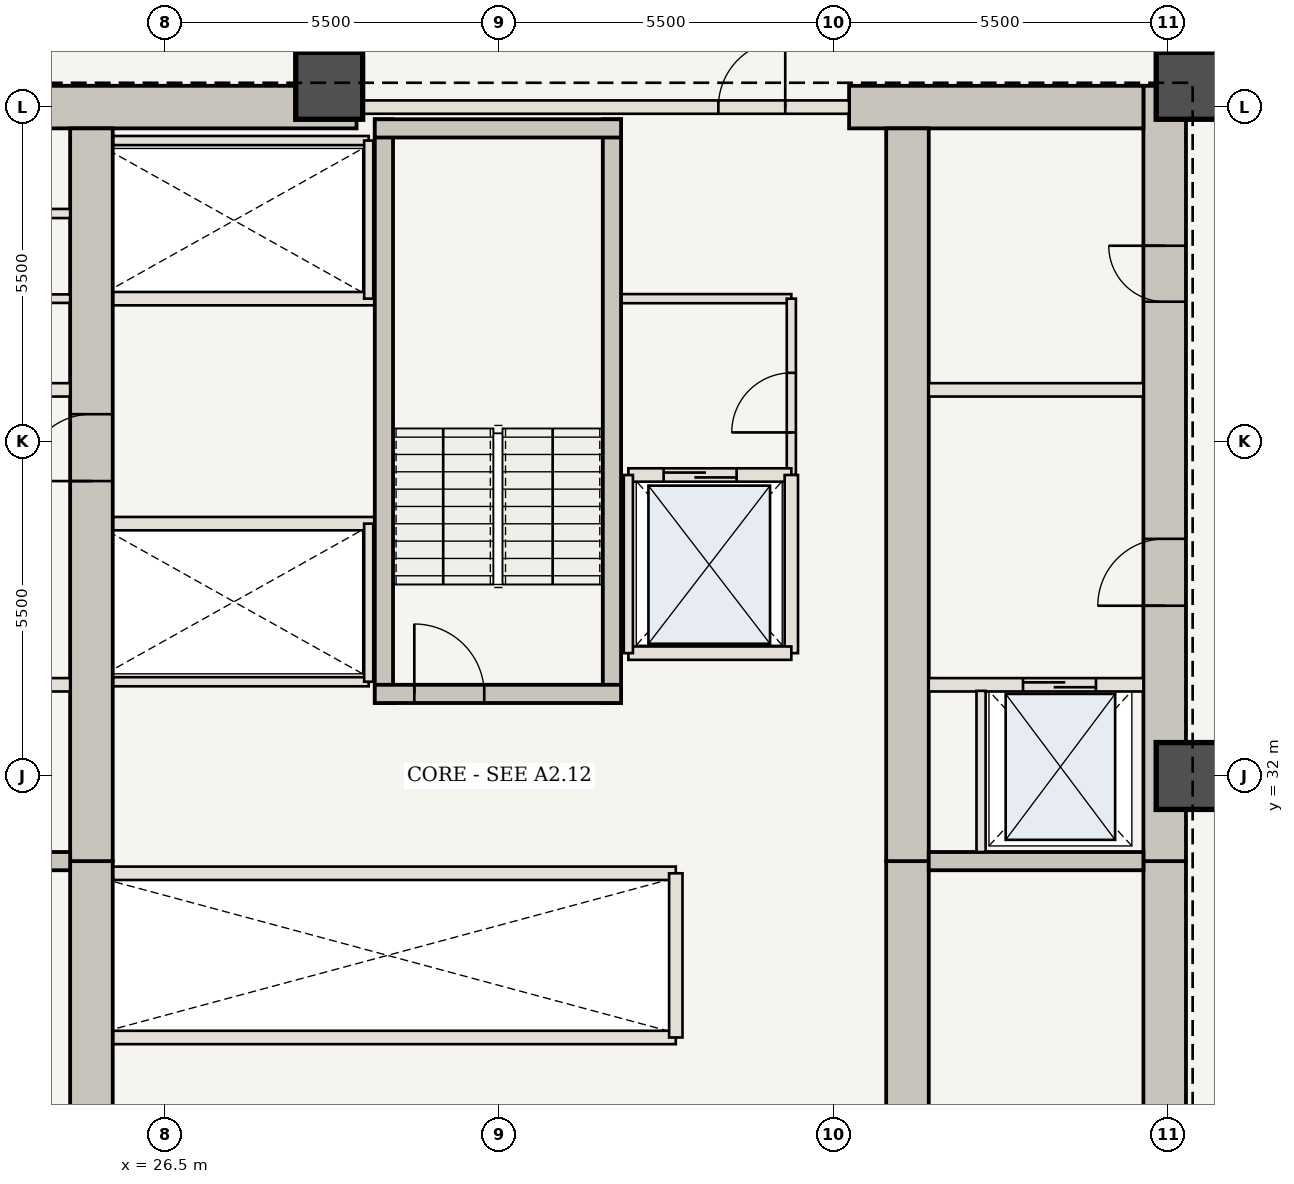
"""IFC4 building model, lengths in metres.
Left out: names, types, materials, properties, quantities, classifications, styles, units other than length and angle.
Written with IfcOpenShell. Run it as: python <this file> out.ifc"""

import sys

from ifc_helpers import new_model, si_unit, direction, frame, frame_2d, origin, origin_2d, place, context, subcontext, project, spatial, rectangle, extrude, element, fill, save


model = new_model("IFC4")
c1 = context("Model", 3, precision=1e-05, world=origin(), true_north=direction((0.0, 1.0)))
c2 = subcontext(c1, "Body", "Model", "MODEL_VIEW")
j1 = project(units=[si_unit("LENGTHUNIT", "METRE"), si_unit("PLANEANGLEUNIT", "RADIAN")], contexts=[c1])
p1 = place(None, origin())
s1 = spatial("IfcSite", under=j1, at=p1, CompositionType="ELEMENT")
p2 = place(p1, origin())
s2 = spatial("IfcBuilding", under=s1, at=p2, CompositionType="ELEMENT")
p3 = place(p2, frame((0.0, 0.0, 45.85)))
s3 = spatial("IfcBuildingStorey", under=s2, at=p3, CompositionType="ELEMENT", Elevation=45.85)
p4 = place(p3, frame((42.94, 20.6, 0.0), z_axis=(0.0, 0.0, 1.0), x_axis=(0.0, 1.0, 0.0)))
e1 = element("IfcWall", 1, at=p4, inside=s3, PredefinedType="SHEAR", context=c2, shape_type="SweptSolid", body=[
    extrude(rectangle(XDim=10.0, YDim=0.7, at=frame_2d((5.0, 0.0))), origin(), (0.0, 0.0, 1.0), 3.5),
])
p5 = place(p4, frame((1.15, 0.0, 0.0)))
e2 = element("IfcOpeningElement", 2, at=p5, cuts=e1, PredefinedType="OPENING", context=c2, shape_type="SweptSolid", body=[
    extrude(rectangle(XDim=1.15, YDim=2.15, at=frame_2d((0.575, 1.075))), frame((0.0, 0.36, 0.0), z_axis=(0.0, -1.0, 0.0), x_axis=(1.0, 0.0, 0.0)), (0.0, 0.0, 1.0), 0.72),
])
p6 = place(p3, frame((42.94, 30.6, 0.0), z_axis=(0.0, 0.0, 1.0), x_axis=(0.0, 1.0, 0.0)))
e3 = element("IfcWall", 3, at=p6, inside=s3, PredefinedType="SHEAR", context=c2, shape_type="SweptSolid", body=[
    extrude(rectangle(XDim=12.75, YDim=0.7, at=frame_2d((6.375, 0.0))), origin(), (0.0, 0.0, 1.0), 3.5),
])
p7 = place(p6, frame((4.2, 0.0, 0.0)))
e4 = element("IfcOpeningElement", 4, at=p7, cuts=e3, PredefinedType="OPENING", context=c2, shape_type="SweptSolid", body=[
    extrude(rectangle(XDim=1.1, YDim=2.15, at=frame_2d((0.55, 1.075))), frame((0.0, 0.36, 0.0), z_axis=(0.0, -1.0, 0.0), x_axis=(1.0, 0.0, 0.0)), (0.0, 0.0, 1.0), 0.72),
])
p8 = place(p6, frame((9.2, 0.0, 0.0)))
e5 = element("IfcOpeningElement", 5, at=p8, cuts=e3, PredefinedType="OPENING", context=c2, shape_type="SweptSolid", body=[
    extrude(rectangle(XDim=0.92, YDim=2.1, at=frame_2d((0.46, 1.05))), frame((0.0, 0.36, 0.0), z_axis=(0.0, -1.0, 0.0), x_axis=(1.0, 0.0, 0.0)), (0.0, 0.0, 1.0), 0.72),
])
p9 = place(p3, frame((21.41, 43.0, 0.0), z_axis=(0.0, 0.0, 1.0), x_axis=(1.0, 0.0, 0.0)))
e6 = element("IfcWall", 6, at=p9, inside=s3, PredefinedType="SHEAR", context=c2, shape_type="SweptSolid", body=[
    extrude(rectangle(XDim=8.24, YDim=0.7, at=frame_2d((4.12, 0.0))), origin(), (0.0, 0.0, 1.0), 3.5),
])
p10 = place(p3, frame((37.75, 43.0, 0.0), z_axis=(0.0, 0.0, 1.0), x_axis=(1.0, 0.0, 0.0)))
e7 = element("IfcWall", 7, at=p10, inside=s3, PredefinedType="SHEAR", context=c2, shape_type="SweptSolid", body=[
    extrude(rectangle(XDim=4.84, YDim=0.7, at=frame_2d((2.42, 0.0))), origin(), (0.0, 0.0, 1.0), 3.5),
])
p11 = place(p3, frame((25.29, 21.3, 0.0), z_axis=(0.0, 0.0, 1.0), x_axis=(0.0, 1.0, 0.0)))
e8 = element("IfcWall", 8, at=p11, inside=s3, PredefinedType="SHEAR", context=c2, shape_type="SweptSolid", body=[
    extrude(rectangle(XDim=9.3, YDim=0.7, at=frame_2d((4.65, 0.0))), origin(), (0.0, 0.0, 1.0), 3.5),
])
p12 = place(p3, frame((25.29, 30.6, 0.0), z_axis=(0.0, 0.0, 1.0), x_axis=(0.0, 1.0, 0.0)))
e9 = element("IfcWall", 9, at=p12, inside=s3, PredefinedType="SHEAR", context=c2, shape_type="SweptSolid", body=[
    extrude(rectangle(XDim=12.05, YDim=0.7, at=frame_2d((6.025, 0.0))), origin(), (0.0, 0.0, 1.0), 3.5),
])
p13 = place(p12, frame((6.25, 0.0, 0.0)))
e10 = element("IfcOpeningElement", 10, at=p13, cuts=e9, PredefinedType="OPENING", context=c2, shape_type="SweptSolid", body=[
    extrude(rectangle(XDim=1.1, YDim=2.15, at=frame_2d((0.55, 1.075))), frame((0.0, 0.36, 0.0), z_axis=(0.0, -1.0, 0.0), x_axis=(1.0, 0.0, 0.0)), (0.0, 0.0, 1.0), 0.72),
])
p14 = place(p3, frame((38.71, 21.3, 0.0), z_axis=(0.0, 0.0, 1.0), x_axis=(0.0, 1.0, 0.0)))
e11 = element("IfcWall", 11, at=p14, inside=s3, PredefinedType="SHEAR", context=c2, shape_type="SweptSolid", body=[
    extrude(rectangle(XDim=9.3, YDim=0.7, at=frame_2d((4.65, 0.0))), origin(), (0.0, 0.0, 1.0), 3.5),
])
p15 = place(p3, frame((38.71, 30.6, 0.0), z_axis=(0.0, 0.0, 1.0), x_axis=(0.0, 1.0, 0.0)))
e12 = element("IfcWall", 12, at=p15, inside=s3, PredefinedType="SHEAR", context=c2, shape_type="SweptSolid", body=[
    extrude(rectangle(XDim=12.05, YDim=0.7, at=frame_2d((6.025, 0.0))), origin(), (0.0, 0.0, 1.0), 3.5),
])
for number, where, z_axis, x_axis in (
    (13, (43.35, 32.0, 0.0), (0.0, 0.0, 1.0), (1.0, 0.0, 0.0)),
    (14, (43.35, 43.35, 0.0), (0.0, 0.0, 1.0), (1.0, 0.0, 0.0)),
    (15, (29.2, 43.35, 0.0), (0.0, 0.0, 1.0), (1.0, 0.0, 0.0)),
):
    element("IfcColumn", number, at=place(p3, frame(where, z_axis=z_axis, x_axis=x_axis)), inside=s3, PredefinedType="COLUMN", context=c2, shape_type="SweptSolid", body=[
        extrude(rectangle(XDim=1.1, YDim=1.1, at=origin_2d()), origin(), (0.0, 0.0, 1.0), 3.5),
    ])
for number, where, z_axis, x_axis in (
    (16, (21.41, 30.6, 0.0), (0.0, 0.0, 1.0), (1.0, 0.0, 0.0)),
    (17, (39.06, 30.6, 0.0), (0.0, 0.0, 1.0), (1.0, 0.0, 0.0)),
):
    element("IfcWall", number, at=place(p3, frame(where, z_axis=z_axis, x_axis=x_axis)), inside=s3, PredefinedType="SHEAR", context=c2, shape_type="SweptSolid", body=[
        extrude(rectangle(XDim=3.53, YDim=0.3, at=frame_2d((1.765, 0.0))), origin(), (0.0, 0.0, 1.0), 3.32),
    ])
p16 = place(p3, frame((21.41, 33.5, 0.0), z_axis=(0.0, 0.0, 1.0), x_axis=(1.0, 0.0, 0.0)))
e18 = element("IfcWall", 18, at=p16, inside=s3, PredefinedType="STANDARD", context=c2, shape_type="SweptSolid", body=[
    extrude(rectangle(XDim=3.53, YDim=0.22, at=frame_2d((1.765, 0.0))), origin(), (0.0, 0.0, 1.0), 3.32),
])
p17 = place(p16, frame((0.75, 0.0, 0.0)))
e19 = element("IfcOpeningElement", 19, at=p17, cuts=e18, PredefinedType="OPENING", context=c2, shape_type="SweptSolid", body=[
    extrude(rectangle(XDim=1.2, YDim=2.2, at=frame_2d((0.6, 1.1))), frame((0.0, 0.12, 0.0), z_axis=(0.0, -1.0, 0.0), x_axis=(1.0, 0.0, 0.0)), (0.0, 0.0, 1.0), 0.24),
])
p18 = place(p3, frame((39.06, 33.5, 0.0), z_axis=(0.0, 0.0, 1.0), x_axis=(1.0, 0.0, 0.0)))
e20 = element("IfcWall", 20, at=p18, inside=s3, PredefinedType="STANDARD", context=c2, shape_type="SweptSolid", body=[
    extrude(rectangle(XDim=3.53, YDim=0.22, at=frame_2d((1.765, 0.0))), origin(), (0.0, 0.0, 1.0), 3.32),
])
p19 = place(p18, frame((1.55, 0.0, 0.0)))
e21 = element("IfcOpeningElement", 21, at=p19, cuts=e20, PredefinedType="OPENING", context=c2, shape_type="SweptSolid", body=[
    extrude(rectangle(XDim=1.2, YDim=2.2, at=frame_2d((0.6, 1.1))), frame((0.0, 0.12, 0.0), z_axis=(0.0, -1.0, 0.0), x_axis=(1.0, 0.0, 0.0)), (0.0, 0.0, 1.0), 0.24),
])
p20 = place(p3, frame((39.92, 30.75, 0.0), z_axis=(0.0, 0.0, 1.0), x_axis=(0.0, 1.0, 0.0)))
e22 = element("IfcWall", 22, at=p20, inside=s3, PredefinedType="STANDARD", context=c2, shape_type="SweptSolid", body=[
    extrude(rectangle(XDim=2.65, YDim=0.15, at=frame_2d((1.325, 0.0))), origin(), (0.0, 0.0, 1.0), 3.32),
])
for number, where, z_axis, x_axis in (
    (23, (21.41, 38.35, 0.0), (0.0, 0.0, 1.0), (1.0, 0.0, 0.0)),
    (24, (39.06, 38.35, 0.0), (0.0, 0.0, 1.0), (1.0, 0.0, 0.0)),
):
    element("IfcWall", number, at=place(p3, frame(where, z_axis=z_axis, x_axis=x_axis)), inside=s3, PredefinedType="STANDARD", context=c2, shape_type="SweptSolid", body=[
        extrude(rectangle(XDim=3.53, YDim=0.22, at=frame_2d((1.765, 0.0))), origin(), (0.0, 0.0, 1.0), 3.32),
    ])
p21 = place(p3, frame((21.41, 39.85, 0.0), z_axis=(0.0, 0.0, 1.0), x_axis=(1.0, 0.0, 0.0)))
e25 = element("IfcWall", 25, at=p21, inside=s3, PredefinedType="STANDARD", context=c2, shape_type="SweptSolid", body=[
    extrude(rectangle(XDim=3.53, YDim=0.14, at=frame_2d((1.765, 0.0))), origin(), (0.0, 0.0, 1.0), 3.32),
])
p22 = place(p3, frame((21.41, 41.25, 0.0), z_axis=(0.0, 0.0, 1.0), x_axis=(1.0, 0.0, 0.0)))
e26 = element("IfcWall", 26, at=p22, inside=s3, PredefinedType="STANDARD", context=c2, shape_type="SweptSolid", body=[
    extrude(rectangle(XDim=3.53, YDim=0.15, at=frame_2d((1.765, 0.0))), origin(), (0.0, 0.0, 1.0), 3.32),
])
p23 = place(p3, frame((34.0, 39.85, 0.0), z_axis=(0.0, 0.0, 1.0), x_axis=(1.0, 0.0, 0.0)))
e27 = element("IfcWall", 27, at=p23, inside=s3, PredefinedType="STANDARD", context=c2, shape_type="SweptSolid", body=[
    extrude(rectangle(XDim=2.8, YDim=0.15, at=frame_2d((1.4, 0.0))), origin(), (0.0, 0.0, 1.0), 3.32),
])
p24 = place(p3, frame((36.8, 36.95, 0.0), z_axis=(0.0, 0.0, 1.0), x_axis=(0.0, 1.0, 0.0)))
e28 = element("IfcWall", 28, at=p24, inside=s3, PredefinedType="STANDARD", context=c2, shape_type="SweptSolid", body=[
    extrude(rectangle(XDim=2.9, YDim=0.15, at=frame_2d((1.45, 0.0))), origin(), (0.0, 0.0, 1.0), 3.32),
])
p25 = place(p24, frame((0.7, 0.0, 0.0)))
e29 = element("IfcOpeningElement", 29, at=p25, cuts=e28, PredefinedType="OPENING", context=c2, shape_type="SweptSolid", body=[
    extrude(rectangle(XDim=0.98, YDim=2.2, at=frame_2d((0.49, 1.1))), frame((0.0, 0.085, 0.0), z_axis=(0.0, -1.0, 0.0), x_axis=(1.0, 0.0, 0.0)), (0.0, 0.0, 1.0), 0.17),
])
for number, where, z_axis, x_axis in (
    (30, (25.65, 27.7, 0.0), (0.0, 0.0, 1.0), (1.0, 0.0, 0.0)),
    (31, (25.65, 30.4, 0.0), (0.0, 0.0, 1.0), (1.0, 0.0, 0.0)),
):
    element("IfcWall", number, at=place(p3, frame(where, z_axis=z_axis, x_axis=x_axis)), inside=s3, PredefinedType="STANDARD", context=c2, shape_type="SweptSolid", body=[
        extrude(rectangle(XDim=9.25, YDim=0.22, at=frame_2d((4.625, 0.0))), origin(), (0.0, 0.0, 1.0), 3.32),
    ])
p26 = place(p3, frame((34.9, 27.7, 0.0), z_axis=(0.0, 0.0, 1.0), x_axis=(0.0, 1.0, 0.0)))
e32 = element("IfcWall", 32, at=p26, inside=s3, PredefinedType="STANDARD", context=c2, shape_type="SweptSolid", body=[
    extrude(rectangle(XDim=2.7, YDim=0.22, at=frame_2d((1.35, 0.0))), origin(), (0.0, 0.0, 1.0), 3.32),
])
p27 = place(p3, frame((25.65, 36.15, 0.0), z_axis=(0.0, 0.0, 1.0), x_axis=(1.0, 0.0, 0.0)))
e33 = element("IfcWall", 33, at=p27, inside=s3, PredefinedType="STANDARD", context=c2, shape_type="SweptSolid", body=[
    extrude(rectangle(XDim=4.3, YDim=0.22, at=frame_2d((2.15, 0.0))), origin(), (0.0, 0.0, 1.0), 3.32),
])
p28 = place(p3, frame((25.65, 33.55, 0.0), z_axis=(0.0, 0.0, 1.0), x_axis=(1.0, 0.0, 0.0)))
e34 = element("IfcWall", 34, at=p28, inside=s3, PredefinedType="STANDARD", context=c2, shape_type="SweptSolid", body=[
    extrude(rectangle(XDim=4.2, YDim=0.15, at=frame_2d((2.1, 0.0))), origin(), (0.0, 0.0, 1.0), 3.32),
])
p29 = place(p3, frame((29.85, 33.55, 0.0), z_axis=(0.0, 0.0, 1.0), x_axis=(0.0, 1.0, 0.0)))
e35 = element("IfcWall", 35, at=p29, inside=s3, PredefinedType="STANDARD", context=c2, shape_type="SweptSolid", body=[
    extrude(rectangle(XDim=2.6, YDim=0.15, at=frame_2d((1.3, 0.0))), origin(), (0.0, 0.0, 1.0), 3.32),
])
p30 = place(p3, frame((25.65, 39.85, 0.0), z_axis=(0.0, 0.0, 1.0), x_axis=(1.0, 0.0, 0.0)))
e36 = element("IfcWall", 36, at=p30, inside=s3, PredefinedType="STANDARD", context=c2, shape_type="SweptSolid", body=[
    extrude(rectangle(XDim=4.3, YDim=0.22, at=frame_2d((2.15, 0.0))), origin(), (0.0, 0.0, 1.0), 3.32),
])
p31 = place(p3, frame((25.65, 42.45, 0.0), z_axis=(0.0, 0.0, 1.0), x_axis=(1.0, 0.0, 0.0)))
e37 = element("IfcWall", 37, at=p31, inside=s3, PredefinedType="STANDARD", context=c2, shape_type="SweptSolid", body=[
    extrude(rectangle(XDim=4.2, YDim=0.15, at=frame_2d((2.1, 0.0))), origin(), (0.0, 0.0, 1.0), 3.32),
])
p32 = place(p3, frame((29.85, 39.85, 0.0), z_axis=(0.0, 0.0, 1.0), x_axis=(0.0, 1.0, 0.0)))
e38 = element("IfcWall", 38, at=p32, inside=s3, PredefinedType="STANDARD", context=c2, shape_type="SweptSolid", body=[
    extrude(rectangle(XDim=2.6, YDim=0.15, at=frame_2d((1.3, 0.0))), origin(), (0.0, 0.0, 1.0), 3.32),
])
for number, where, z_axis, x_axis in (
    (39, (30.1, 33.2, 0.0), (0.0, 0.0, 1.0), (0.0, 1.0, 0.0)),
    (40, (33.85, 33.2, 0.0), (0.0, 0.0, 1.0), (0.0, 1.0, 0.0)),
):
    element("IfcWall", number, at=place(p3, frame(where, z_axis=z_axis, x_axis=x_axis)), inside=s3, PredefinedType="SHEAR", context=c2, shape_type="SweptSolid", body=[
        extrude(rectangle(XDim=9.6, YDim=0.3, at=frame_2d((4.8, 0.0))), origin(), (0.0, 0.0, 1.0), 3.32),
    ])
p33 = place(p3, frame((29.95, 33.35, 0.0), z_axis=(0.0, 0.0, 1.0), x_axis=(1.0, 0.0, 0.0)))
e41 = element("IfcWall", 41, at=p33, inside=s3, PredefinedType="SHEAR", context=c2, shape_type="SweptSolid", body=[
    extrude(rectangle(XDim=4.05, YDim=0.3, at=frame_2d((2.025, 0.0))), origin(), (0.0, 0.0, 1.0), 3.32),
])
p34 = place(p33, frame((0.65, 0.0, 0.0)))
e42 = element("IfcOpeningElement", 42, at=p34, cuts=e41, PredefinedType="OPENING", context=c2, shape_type="SweptSolid", body=[
    extrude(rectangle(XDim=1.15, YDim=2.15, at=frame_2d((0.575, 1.075))), frame((0.0, 0.16, 0.0), z_axis=(0.0, -1.0, 0.0), x_axis=(1.0, 0.0, 0.0)), (0.0, 0.0, 1.0), 0.32),
])
p35 = place(p3, frame((29.95, 42.65, 0.0), z_axis=(0.0, 0.0, 1.0), x_axis=(1.0, 0.0, 0.0)))
e43 = element("IfcWall", 43, at=p35, inside=s3, PredefinedType="SHEAR", context=c2, shape_type="SweptSolid", body=[
    extrude(rectangle(XDim=4.05, YDim=0.3, at=frame_2d((2.025, 0.0))), origin(), (0.0, 0.0, 1.0), 3.32),
])
p36 = place(p3, frame((29.65, 43.0, 0.0), z_axis=(0.0, 0.0, 1.0), x_axis=(1.0, 0.0, 0.0)))
e44 = element("IfcWall", 44, at=p36, inside=s3, PredefinedType="STANDARD", context=c2, shape_type="SweptSolid", body=[
    extrude(rectangle(XDim=8.1, YDim=0.22, at=frame_2d((4.05, 0.0))), origin(), (0.0, 0.0, 1.0), 3.32),
])
p37 = place(p36, frame((5.95, 0.0, 0.0)))
e45 = element("IfcOpeningElement", 45, at=p37, cuts=e44, PredefinedType="OPENING", context=c2, shape_type="SweptSolid", body=[
    extrude(rectangle(XDim=1.1, YDim=2.15, at=frame_2d((0.55, 1.075))), frame((0.0, 0.12, 0.0), z_axis=(0.0, -1.0, 0.0), x_axis=(1.0, 0.0, 0.0)), (0.0, 0.0, 1.0), 0.24),
])
p38 = place(p3, frame((34.12, 36.95, 0.0), z_axis=(0.0, 0.0, 1.0), x_axis=(1.0, 0.0, 0.0)))
e46 = element("IfcWall", 46, at=p38, inside=s3, PredefinedType="STANDARD", context=c2, shape_type="SweptSolid", body=[
    extrude(rectangle(XDim=2.68, YDim=0.22, at=frame_2d((1.34, 0.0))), origin(), (0.0, 0.0, 1.0), 3.32),
])
p39 = place(p38, frame((0.58, 0.0, 0.0)))
e47 = element("IfcOpeningElement", 47, at=p39, cuts=e46, PredefinedType="OPENING", context=c2, shape_type="SweptSolid", body=[
    extrude(rectangle(XDim=1.2, YDim=2.2, at=frame_2d((0.6, 1.1))), frame((0.0, 0.12, 0.0), z_axis=(0.0, -1.0, 0.0), x_axis=(1.0, 0.0, 0.0)), (0.0, 0.0, 1.0), 0.24),
])
p40 = place(p3, frame((36.8, 34.02, 0.0), z_axis=(0.0, 0.0, 1.0), x_axis=(0.0, 1.0, 0.0)))
e48 = element("IfcWall", 48, at=p40, inside=s3, PredefinedType="STANDARD", context=c2, shape_type="SweptSolid", body=[
    extrude(rectangle(XDim=2.93, YDim=0.22, at=frame_2d((1.465, 0.0))), origin(), (0.0, 0.0, 1.0), 3.32),
])
p41 = place(p3, frame((34.12, 34.02, 0.0), z_axis=(0.0, 0.0, 1.0), x_axis=(1.0, 0.0, 0.0)))
e49 = element("IfcWall", 49, at=p41, inside=s3, PredefinedType="STANDARD", context=c2, shape_type="SweptSolid", body=[
    extrude(rectangle(XDim=2.68, YDim=0.22, at=frame_2d((1.34, 0.0))), origin(), (0.0, 0.0, 1.0), 3.32),
])
p42 = place(p3, frame((34.12, 34.02, 0.0), z_axis=(0.0, 0.0, 1.0), x_axis=(0.0, 1.0, 0.0)))
e50 = element("IfcWall", 50, at=p42, inside=s3, PredefinedType="STANDARD", context=c2, shape_type="SweptSolid", body=[
    extrude(rectangle(XDim=2.93, YDim=0.15, at=frame_2d((1.465, 0.0))), origin(), (0.0, 0.0, 1.0), 3.32),
])
p43 = place(p7, origin())
e51 = element("IfcDoor", 51, at=p43, inside=s3, OperationType="SINGLE_SWING_LEFT", PredefinedType="DOOR", context=c2, shape_type="SweptSolid", body=[
    extrude(rectangle(XDim=1.1, YDim=2.15, at=frame_2d((0.55, 1.075))), frame((0.0, 0.025, 0.0), z_axis=(0.0, -1.0, 0.0), x_axis=(1.0, 0.0, 0.0)), (0.0, 0.0, 1.0), 0.05),
])
fill(e4, e51)
p44 = place(p13, origin())
e52 = element("IfcDoor", 52, at=p44, inside=s3, OperationType="SINGLE_SWING_LEFT", PredefinedType="DOOR", context=c2, shape_type="SweptSolid", body=[
    extrude(rectangle(XDim=1.1, YDim=2.15, at=frame_2d((0.55, 1.075))), frame((0.0, 0.025, 0.0), z_axis=(0.0, -1.0, 0.0), x_axis=(1.0, 0.0, 0.0)), (0.0, 0.0, 1.0), 0.05),
])
fill(e10, e52)
p45 = place(p8, origin())
e53 = element("IfcDoor", 53, at=p45, inside=s3, OperationType="SINGLE_SWING_RIGHT", PredefinedType="DOOR", context=c2, shape_type="SweptSolid", body=[
    extrude(rectangle(XDim=0.92, YDim=2.1, at=frame_2d((0.46, 1.05))), frame((0.0, 0.025, 0.0), z_axis=(0.0, -1.0, 0.0), x_axis=(1.0, 0.0, 0.0)), (0.0, 0.0, 1.0), 0.05),
])
fill(e5, e53)
p46 = place(p19, origin())
e54 = element("IfcDoor", 54, at=p46, inside=s3, OperationType="DOUBLE_DOOR_SLIDING", PredefinedType="DOOR", context=c2, shape_type="SweptSolid", body=[
    extrude(rectangle(XDim=1.2, YDim=2.2, at=frame_2d((0.6, 1.1))), frame((0.0, 0.025, 0.0), z_axis=(0.0, -1.0, 0.0), x_axis=(1.0, 0.0, 0.0)), (0.0, 0.0, 1.0), 0.05),
])
fill(e21, e54)
p47 = place(p25, origin())
e55 = element("IfcDoor", 55, at=p47, inside=s3, OperationType="SINGLE_SWING_LEFT", PredefinedType="DOOR", context=c2, shape_type="SweptSolid", body=[
    extrude(rectangle(XDim=0.98, YDim=2.2, at=frame_2d((0.49, 1.1))), frame((0.0, 0.025, 0.0), z_axis=(0.0, -1.0, 0.0), x_axis=(1.0, 0.0, 0.0)), (0.0, 0.0, 1.0), 0.05),
])
fill(e29, e55)
p48 = place(p34, origin())
e56 = element("IfcDoor", 56, at=p48, inside=s3, OperationType="SINGLE_SWING_LEFT", PredefinedType="DOOR", context=c2, shape_type="SweptSolid", body=[
    extrude(rectangle(XDim=1.15, YDim=2.15, at=frame_2d((0.575, 1.075))), frame((0.0, 0.025, 0.0), z_axis=(0.0, -1.0, 0.0), x_axis=(1.0, 0.0, 0.0)), (0.0, 0.0, 1.0), 0.05),
])
fill(e42, e56)
p49 = place(p37, origin())
e57 = element("IfcDoor", 57, at=p49, inside=s3, OperationType="SINGLE_SWING_RIGHT", PredefinedType="DOOR", context=c2, shape_type="SweptSolid", body=[
    extrude(rectangle(XDim=1.1, YDim=2.15, at=frame_2d((0.55, 1.075))), frame((0.0, 0.025, 0.0), z_axis=(0.0, -1.0, 0.0), x_axis=(1.0, 0.0, 0.0)), (0.0, 0.0, 1.0), 0.05),
])
fill(e45, e57)
p50 = place(p39, origin())
e58 = element("IfcDoor", 58, at=p50, inside=s3, OperationType="DOUBLE_DOOR_SLIDING", PredefinedType="DOOR", context=c2, shape_type="SweptSolid", body=[
    extrude(rectangle(XDim=1.2, YDim=2.2, at=frame_2d((0.6, 1.1))), frame((0.0, 0.025, 0.0), z_axis=(0.0, -1.0, 0.0), x_axis=(1.0, 0.0, 0.0)), (0.0, 0.0, 1.0), 0.05),
])
fill(e47, e58)
save(model, sys.argv[1])
